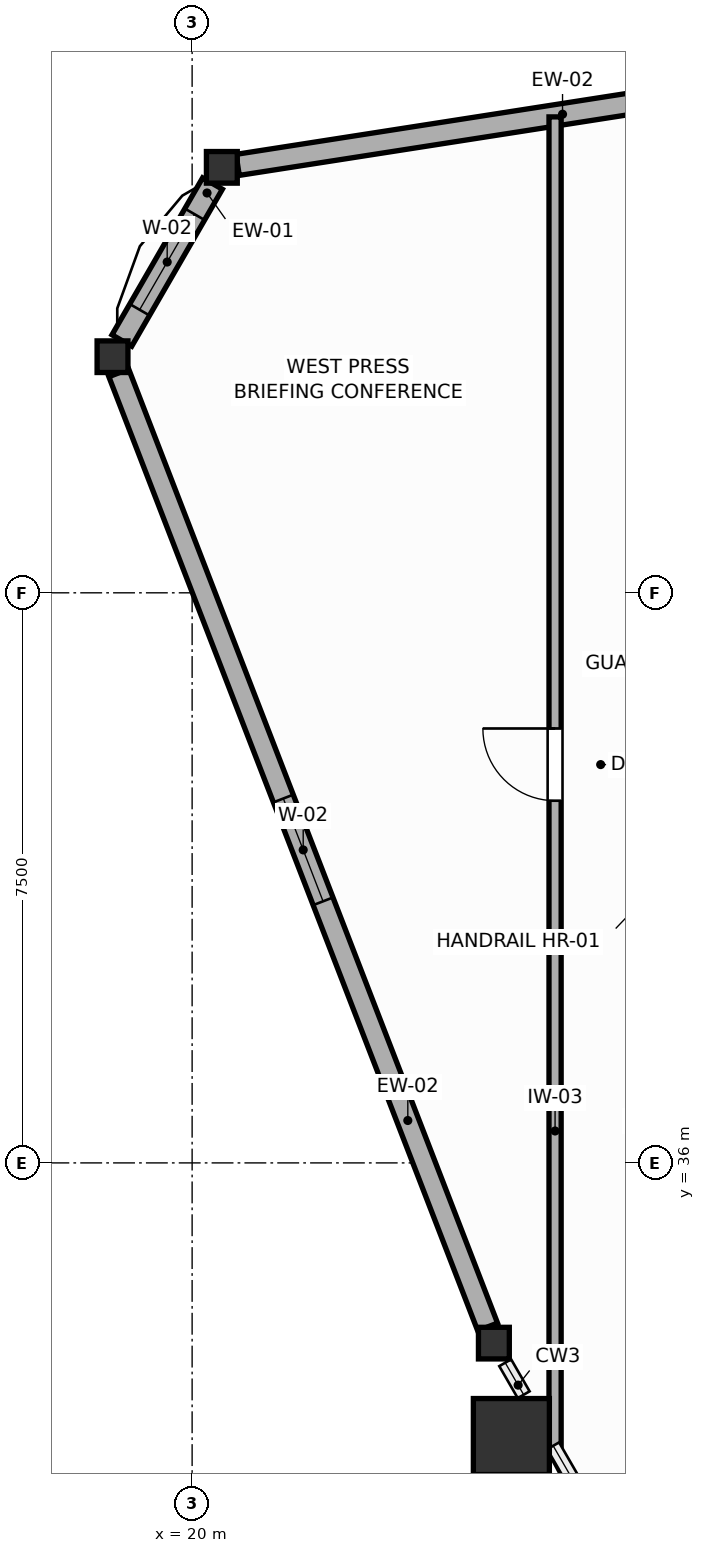
"""IFC4 building model, lengths in metres.
Left out: names, types, materials, properties, quantities, classifications, styles, units other than length and angle.
Written with IfcOpenShell. Run it as: python <this file> out.ifc"""

import sys

from ifc_helpers import new_model, si_unit, direction, frame, frame_2d, origin, origin_2d, place, context, subcontext, project, spatial, rectangle, i_section, extrude, source, transform, mapped, element, fill, save


model = new_model("IFC4")
c1 = context("Model", 3, precision=1e-05, world=origin(), true_north=direction((0.0, 1.0)))
c2 = subcontext(c1, "Body", "Model", "MODEL_VIEW")
j1 = project(units=[si_unit("LENGTHUNIT", "METRE"), si_unit("PLANEANGLEUNIT", "RADIAN")], contexts=[c1])
p1 = place(None, origin())
s1 = spatial("IfcSite", under=j1, at=p1, CompositionType="ELEMENT")
p2 = place(p1, origin())
s2 = spatial("IfcBuilding", under=s1, at=p2, CompositionType="ELEMENT")
p3 = place(p2, frame((0.0, 0.0, 227.4)))
s3 = spatial("IfcBuildingStorey", under=s2, at=p3, CompositionType="ELEMENT", Elevation=227.4)
m1 = source(origin(), c2, "Body", "SweptSolid", [
    extrude(rectangle(XDim=1.0, YDim=1.0, at=origin_2d()), origin(), (0.0, 0.0, 1.0), 3.6),
])
p4 = place(p3, frame((24.2, 32.4, 0.0), z_axis=(0.0, 0.0, 1.0), x_axis=(1.0, 0.0, 0.0)))
e1 = element("IfcColumn", 1, at=p4, inside=s3, PredefinedType="COLUMN", context=c2, shape_type="MappedRepresentation", body=[
    mapped(m1, transform((0.0, 0.0, 0.0), scale=1.0)),
])
m2 = source(origin(), c2, "Body", "SweptSolid", [
    extrude(i_section(OverallWidth=0.406, OverallDepth=0.416, WebThickness=0.027, FlangeThickness=0.044, FilletRadius=0.015, at=origin_2d()), origin(), (0.0, 0.0, 1.0), 3.6),
])
for number, where, z_axis, x_axis in (
    (2, (20.391, 49.098, 0.0), (0.0, 0.0, 1.0), (1.0, 0.0, 0.0)),
    (3, (18.953, 46.606, 0.0), (0.0, 0.0, 1.0), (1.0, 0.0, 0.0)),
    (4, (23.97, 33.629, 0.0), (0.0, 0.0, 1.0), (1.0, 0.0, 0.0)),
):
    element("IfcColumn", number, at=place(p3, frame(where, z_axis=z_axis, x_axis=x_axis)), inside=s3, PredefinedType="COLUMN", context=c2, shape_type="MappedRepresentation", body=[
        mapped(m2, transform((0.0, 0.0, 0.0), scale=1.0)),
    ])
p5 = place(p3, frame((33.93, 51.209, 0.0), z_axis=(0.0, 0.0, 1.0), x_axis=(-0.988058563106, -0.154078797613, 0.0)))
e5 = element("IfcWall", 5, at=p5, inside=s3, PredefinedType="SOLIDWALL", context=c2, shape_type="SweptSolid", body=[
    extrude(rectangle(XDim=13.492, YDim=0.28, at=frame_2d((6.746, 0.0))), origin(), (0.0, 0.0, 1.0), 2.96),
])
p6 = place(p5, frame((3.211, 0.0, 0.75)))
e6 = element("IfcOpeningElement", 6, at=p6, cuts=e5, PredefinedType="OPENING", context=c2, shape_type="SweptSolid", body=[
    extrude(rectangle(XDim=1.45, YDim=1.65, at=frame_2d((0.725, 0.825))), frame((0.0, 0.15, 0.0), z_axis=(0.0, -1.0, 0.0), x_axis=(1.0, 0.0, 0.0)), (0.0, 0.0, 1.0), 0.3),
])
p7 = place(p3, frame((20.268, 48.885, 0.0), z_axis=(0.0, 0.0, 1.0), x_axis=(-0.500014901547, -0.866016800201, 0.0)))
e7 = element("IfcWall", 7, at=p7, inside=s3, PredefinedType="SOLIDWALL", context=c2, shape_type="SweptSolid", body=[
    extrude(rectangle(XDim=2.385, YDim=0.3, at=frame_2d((1.192, 0.0))), origin(), (0.0, 0.0, 1.0), 3.02),
])
p8 = place(p7, frame((0.467, 0.0, 0.75)))
e8 = element("IfcOpeningElement", 8, at=p8, cuts=e7, PredefinedType="OPENING", context=c2, shape_type="SweptSolid", body=[
    extrude(rectangle(XDim=1.45, YDim=1.65, at=frame_2d((0.725, 0.825))), frame((0.0, 0.16, 0.0), z_axis=(0.0, -1.0, 0.0), x_axis=(1.0, 0.0, 0.0)), (0.0, 0.0, 1.0), 0.32),
])
p9 = place(p3, frame((19.035, 46.393, 0.0), z_axis=(0.0, 0.0, 1.0), x_axis=(0.360620992305, -0.93271244224, 0.0)))
e9 = element("IfcWall", 9, at=p9, inside=s3, PredefinedType="SOLIDWALL", context=c2, shape_type="SweptSolid", body=[
    extrude(rectangle(XDim=13.457, YDim=0.28, at=frame_2d((6.729, 0.0))), origin(), (0.0, 0.0, 1.0), 3.02),
])
p10 = place(p9, frame((6.003, 0.0, 0.75)))
e10 = element("IfcOpeningElement", 10, at=p10, cuts=e9, PredefinedType="OPENING", context=c2, shape_type="SweptSolid", body=[
    extrude(rectangle(XDim=1.45, YDim=1.65, at=frame_2d((0.725, 0.825))), frame((0.0, 0.15, 0.0), z_axis=(0.0, -1.0, 0.0), x_axis=(1.0, 0.0, 0.0)), (0.0, 0.0, 1.0), 0.3),
])
p11 = place(p3, frame((24.775, 32.255, 0.0), z_axis=(0.0, 0.0, 1.0), x_axis=(0.0, 1.0, 0.0)))
e11 = element("IfcWall", 11, at=p11, inside=s3, PredefinedType="PARTITIONING", context=c2, shape_type="SweptSolid", body=[
    extrude(rectangle(XDim=17.507, YDim=0.16, at=frame_2d((8.753, 0.0))), origin(), (0.0, 0.0, 1.0), 3.41),
])
p12 = place(p11, frame((8.51, 0.0, 0.0)))
e12 = element("IfcOpeningElement", 12, at=p12, cuts=e11, PredefinedType="OPENING", context=c2, shape_type="SweptSolid", body=[
    extrude(rectangle(XDim=0.95, YDim=2.05, at=frame_2d((0.475, 1.025))), frame((0.0, 0.09, 0.0), z_axis=(0.0, -1.0, 0.0), x_axis=(1.0, 0.0, 0.0)), (0.0, 0.0, 1.0), 0.18),
])
p13 = place(p8, origin())
e13 = element("IfcWindow", 13, at=p13, inside=s3, PartitioningType="SINGLE_PANEL", PredefinedType="WINDOW", context=c2, shape_type="SweptSolid", body=[
    extrude(rectangle(XDim=1.45, YDim=1.65, at=frame_2d((0.725, 0.825))), frame((0.0, 0.03, 0.0), z_axis=(0.0, -1.0, 0.0), x_axis=(1.0, 0.0, 0.0)), (0.0, 0.0, 1.0), 0.06),
])
fill(e8, e13)
p14 = place(p10, origin())
e14 = element("IfcWindow", 14, at=p14, inside=s3, PartitioningType="SINGLE_PANEL", PredefinedType="WINDOW", context=c2, shape_type="SweptSolid", body=[
    extrude(rectangle(XDim=1.45, YDim=1.65, at=frame_2d((0.725, 0.825))), frame((0.0, 0.03, 0.0), z_axis=(0.0, -1.0, 0.0), x_axis=(1.0, 0.0, 0.0)), (0.0, 0.0, 1.0), 0.06),
])
fill(e10, e14)
p15 = place(p12, origin())
e15 = element("IfcDoor", 15, at=p15, inside=s3, OperationType="SINGLE_SWING_RIGHT", PredefinedType="DOOR", context=c2, shape_type="SweptSolid", body=[
    extrude(rectangle(XDim=0.95, YDim=2.05, at=frame_2d((0.475, 1.025))), frame((0.0, 0.025, 0.0), z_axis=(0.0, -1.0, 0.0), x_axis=(1.0, 0.0, 0.0)), (0.0, 0.0, 1.0), 0.05),
])
fill(e12, e15)
save(model, sys.argv[1])
